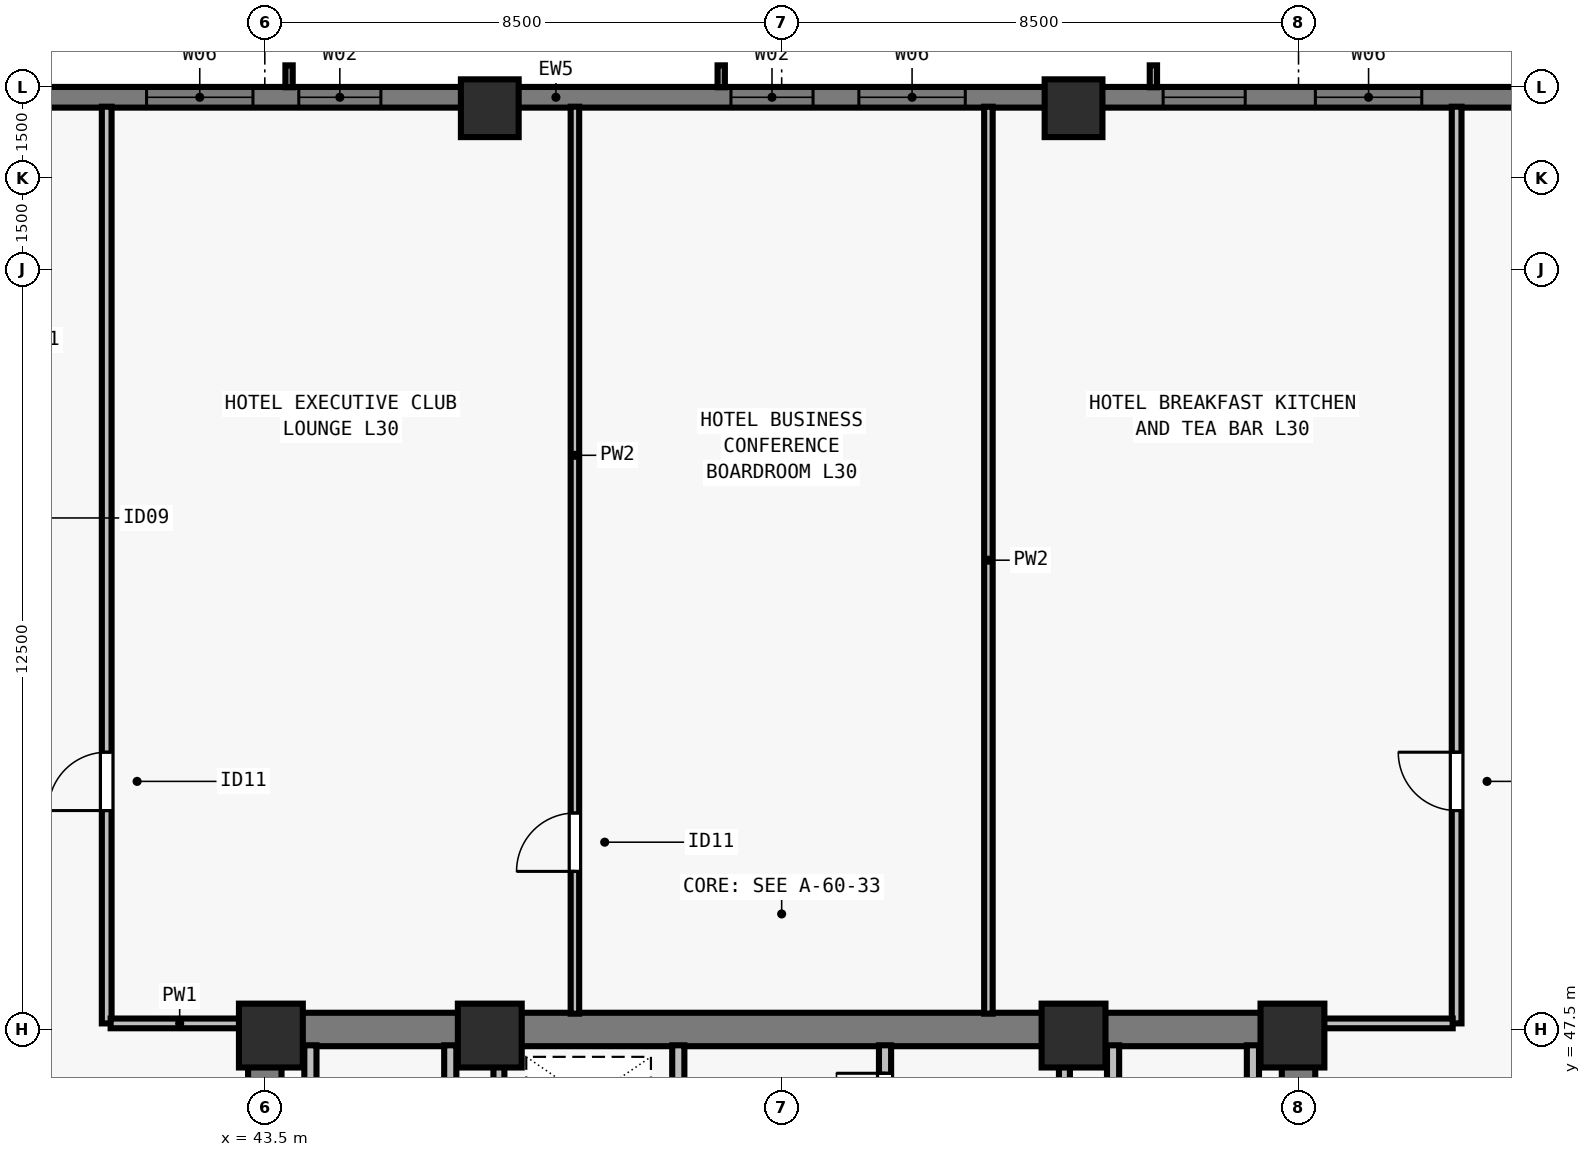
"""IFC4 building model, lengths in metres.
Left out: names, types, materials, properties, quantities, classifications, styles, units other than length and angle.
Written with IfcOpenShell. Run it as: python <this file> out.ifc"""

import sys

from ifc_helpers import new_model, si_unit, direction, frame, frame_2d, origin, origin_2d, place, context, subcontext, project, spatial, rectangle, extrude, element, fill, save


model = new_model("IFC4")
c1 = context("Model", 3, precision=1e-05, world=origin(), true_north=direction((0.0, 1.0)))
c2 = subcontext(c1, "Body", "Model", "MODEL_VIEW")
j1 = project(units=[si_unit("LENGTHUNIT", "METRE"), si_unit("PLANEANGLEUNIT", "RADIAN")], contexts=[c1])
p1 = place(None, origin())
s1 = spatial("IfcSite", under=j1, at=p1, CompositionType="ELEMENT")
p2 = place(p1, origin())
s2 = spatial("IfcBuilding", under=s1, at=p2, CompositionType="ELEMENT")
p3 = place(p2, frame((0.0, 0.0, 113.0)))
s3 = spatial("IfcBuildingStorey", under=s2, at=p3, CompositionType="ELEMENT", Elevation=113.0)
for number, where, z_axis, x_axis in (
    (1, (43.6, 47.4, 0.0), (0.0, 0.0, 1.0), (1.0, 0.0, 0.0)),
    (2, (47.2, 47.4, 0.0), (0.0, 0.0, 1.0), (1.0, 0.0, 0.0)),
    (3, (56.8, 47.4, 0.0), (0.0, 0.0, 1.0), (1.0, 0.0, 0.0)),
    (4, (60.4, 47.4, 0.0), (0.0, 0.0, 1.0), (1.0, 0.0, 0.0)),
):
    element("IfcColumn", number, at=place(p3, frame(where, z_axis=z_axis, x_axis=x_axis)), inside=s3, PredefinedType="COLUMN", context=c2, shape_type="SweptSolid", body=[
        extrude(rectangle(XDim=1.05, YDim=1.05, at=origin_2d()), origin(), (0.0, 0.0, 1.0), 3.5),
    ])
for number, where, z_axis, x_axis in (
    (5, (56.8, 62.65, 0.0), (0.0, 0.0, 1.0), (1.0, 0.0, 0.0)),
    (6, (47.2, 62.65, 0.0), (0.0, 0.0, 1.0), (1.0, 0.0, 0.0)),
):
    element("IfcColumn", number, at=place(p3, frame(where, z_axis=z_axis, x_axis=x_axis)), inside=s3, PredefinedType="COLUMN", context=c2, shape_type="SweptSolid", body=[
        extrude(rectangle(XDim=0.95, YDim=0.95, at=origin_2d()), origin(), (0.0, 0.0, 1.0), 3.5),
    ])
p4 = place(p3, frame((32.0, 62.83, 0.0), z_axis=(0.0, 0.0, 1.0), x_axis=(1.0, 0.0, 0.0)))
e7 = element("IfcWall", 7, at=p4, inside=s3, PredefinedType="SOLIDWALL", context=c2, shape_type="SweptSolid", body=[
    extrude(rectangle(XDim=39.682, YDim=0.34, at=frame_2d((19.841, 0.0))), origin(), (0.0, 0.0, 1.0), 3.28),
])
p5 = place(p4, frame((4.952, 0.0, 0.8)))
e8 = element("IfcOpeningElement", 8, at=p5, cuts=e7, PredefinedType="OPENING", context=c2, shape_type="SweptSolid", body=[
    extrude(rectangle(XDim=1.35, YDim=1.66, at=frame_2d((0.675, 0.83))), frame((0.0, 0.18, 0.0), z_axis=(0.0, -1.0, 0.0), x_axis=(1.0, 0.0, 0.0)), (0.0, 0.0, 1.0), 0.36),
])
p6 = place(p4, frame((9.555, 0.0, 0.8)))
e9 = element("IfcOpeningElement", 9, at=p6, cuts=e7, PredefinedType="OPENING", context=c2, shape_type="SweptSolid", body=[
    extrude(rectangle(XDim=1.75, YDim=1.66, at=frame_2d((0.875, 0.83))), frame((0.0, 0.18, 0.0), z_axis=(0.0, -1.0, 0.0), x_axis=(1.0, 0.0, 0.0)), (0.0, 0.0, 1.0), 0.36),
])
p7 = place(p4, frame((12.059, 0.0, 0.8)))
e10 = element("IfcOpeningElement", 10, at=p7, cuts=e7, PredefinedType="OPENING", context=c2, shape_type="SweptSolid", body=[
    extrude(rectangle(XDim=1.35, YDim=1.66, at=frame_2d((0.675, 0.83))), frame((0.0, 0.18, 0.0), z_axis=(0.0, -1.0, 0.0), x_axis=(1.0, 0.0, 0.0)), (0.0, 0.0, 1.0), 0.36),
])
p8 = place(p4, frame((19.166, 0.0, 0.8)))
e11 = element("IfcOpeningElement", 11, at=p8, cuts=e7, PredefinedType="OPENING", context=c2, shape_type="SweptSolid", body=[
    extrude(rectangle(XDim=1.35, YDim=1.66, at=frame_2d((0.675, 0.83))), frame((0.0, 0.18, 0.0), z_axis=(0.0, -1.0, 0.0), x_axis=(1.0, 0.0, 0.0)), (0.0, 0.0, 1.0), 0.36),
])
p9 = place(p4, frame((21.27, 0.0, 0.8)))
e12 = element("IfcOpeningElement", 12, at=p9, cuts=e7, PredefinedType="OPENING", context=c2, shape_type="SweptSolid", body=[
    extrude(rectangle(XDim=1.75, YDim=1.66, at=frame_2d((0.875, 0.83))), frame((0.0, 0.18, 0.0), z_axis=(0.0, -1.0, 0.0), x_axis=(1.0, 0.0, 0.0)), (0.0, 0.0, 1.0), 0.36),
])
p10 = place(p4, frame((26.273, 0.0, 0.8)))
e13 = element("IfcOpeningElement", 13, at=p10, cuts=e7, PredefinedType="OPENING", context=c2, shape_type="SweptSolid", body=[
    extrude(rectangle(XDim=1.35, YDim=1.66, at=frame_2d((0.675, 0.83))), frame((0.0, 0.18, 0.0), z_axis=(0.0, -1.0, 0.0), x_axis=(1.0, 0.0, 0.0)), (0.0, 0.0, 1.0), 0.36),
])
p11 = place(p4, frame((28.777, 0.0, 0.8)))
e14 = element("IfcOpeningElement", 14, at=p11, cuts=e7, PredefinedType="OPENING", context=c2, shape_type="SweptSolid", body=[
    extrude(rectangle(XDim=1.75, YDim=1.66, at=frame_2d((0.875, 0.83))), frame((0.0, 0.18, 0.0), z_axis=(0.0, -1.0, 0.0), x_axis=(1.0, 0.0, 0.0)), (0.0, 0.0, 1.0), 0.36),
])
p12 = place(p4, frame((33.83, 0.0, 0.8)))
e15 = element("IfcOpeningElement", 15, at=p12, cuts=e7, PredefinedType="OPENING", context=c2, shape_type="SweptSolid", body=[
    extrude(rectangle(XDim=1.35, YDim=1.66, at=frame_2d((0.675, 0.83))), frame((0.0, 0.18, 0.0), z_axis=(0.0, -1.0, 0.0), x_axis=(1.0, 0.0, 0.0)), (0.0, 0.0, 1.0), 0.36),
])
p13 = place(p3, frame((43.225, 47.5, 0.0), z_axis=(0.0, 0.0, 1.0), x_axis=(1.0, 0.0, 0.0)))
e16 = element("IfcWall", 16, at=p13, inside=s3, PredefinedType="SHEAR", context=c2, shape_type="SweptSolid", body=[
    extrude(rectangle(XDim=17.55, YDim=0.55, at=frame_2d((8.775, 0.0))), origin(), (0.0, 0.0, 1.0), 3.28),
])
for number, where, z_axis, x_axis in (
    (17, (43.5, 40.8, 0.0), (0.0, 0.0, 1.0), (0.0, 1.0, 0.0)),
    (18, (60.5, 40.8, 0.0), (0.0, 0.0, 1.0), (0.0, 1.0, 0.0)),
):
    element("IfcWall", number, at=place(p3, frame(where, z_axis=z_axis, x_axis=x_axis)), inside=s3, PredefinedType="SHEAR", context=c2, shape_type="SweptSolid", body=[
        extrude(rectangle(XDim=6.435, YDim=0.55, at=frame_2d((3.218, 0.0))), origin(), (0.0, 0.0, 1.0), 3.28),
    ])
p14 = place(p3, frame((50.3, 40.585, 0.0), z_axis=(0.0, 0.0, 1.0), x_axis=(0.0, 1.0, 0.0)))
e19 = element("IfcWall", 19, at=p14, inside=s3, PredefinedType="SOLIDWALL", context=c2, shape_type="SweptSolid", body=[
    extrude(rectangle(XDim=6.655, YDim=0.2, at=frame_2d((3.328, 0.0))), origin(), (0.0, 0.0, 1.0), 3.28),
])
p15 = place(p14, frame((5.065, 0.0, 0.0)))
e20 = element("IfcOpeningElement", 20, at=p15, cuts=e19, PredefinedType="OPENING", context=c2, shape_type="SweptSolid", body=[
    extrude(rectangle(XDim=0.8, YDim=2.08, at=frame_2d((0.4, 1.04))), frame((0.0, 0.11, 0.0), z_axis=(0.0, -1.0, 0.0), x_axis=(1.0, 0.0, 0.0)), (0.0, 0.0, 1.0), 0.22),
])
p16 = place(p3, frame((53.7, 40.585, 0.0), z_axis=(0.0, 0.0, 1.0), x_axis=(0.0, 1.0, 0.0)))
e21 = element("IfcWall", 21, at=p16, inside=s3, PredefinedType="SOLIDWALL", context=c2, shape_type="SweptSolid", body=[
    extrude(rectangle(XDim=6.655, YDim=0.2, at=frame_2d((3.328, 0.0))), origin(), (0.0, 0.0, 1.0), 3.28),
])
p17 = place(p16, frame((0.195, 0.0, 0.0)))
e22 = element("IfcOpeningElement", 22, at=p17, cuts=e21, PredefinedType="OPENING", context=c2, shape_type="SweptSolid", body=[
    extrude(rectangle(XDim=0.8, YDim=2.08, at=frame_2d((0.4, 1.04))), frame((0.0, 0.11, 0.0), z_axis=(0.0, -1.0, 0.0), x_axis=(1.0, 0.0, 0.0)), (0.0, 0.0, 1.0), 0.22),
])
p18 = place(p16, frame((3.735, 0.0, 0.0)))
e23 = element("IfcOpeningElement", 23, at=p18, cuts=e21, PredefinedType="OPENING", context=c2, shape_type="SweptSolid", body=[
    extrude(rectangle(XDim=0.9, YDim=2.12, at=frame_2d((0.45, 1.06))), frame((0.0, 0.11, 0.0), z_axis=(0.0, -1.0, 0.0), x_axis=(1.0, 0.0, 0.0)), (0.0, 0.0, 1.0), 0.22),
])
p19 = place(p16, frame((5.395, 0.0, 0.0)))
e24 = element("IfcOpeningElement", 24, at=p19, cuts=e21, PredefinedType="OPENING", context=c2, shape_type="SweptSolid", body=[
    extrude(rectangle(XDim=0.8, YDim=2.1, at=frame_2d((0.4, 1.05))), frame((0.0, 0.11, 0.0), z_axis=(0.0, -1.0, 0.0), x_axis=(1.0, 0.0, 0.0)), (0.0, 0.0, 1.0), 0.22),
])
for number, where, z_axis, x_axis in (
    (25, (46.55, 43.735, 0.0), (0.0, 0.0, 1.0), (0.0, 1.0, 0.0)),
    (26, (44.25, 43.735, 0.0), (0.0, 0.0, 1.0), (0.0, 1.0, 0.0)),
    (27, (57.45, 43.735, 0.0), (0.0, 0.0, 1.0), (0.0, 1.0, 0.0)),
    (28, (59.75, 43.735, 0.0), (0.0, 0.0, 1.0), (0.0, 1.0, 0.0)),
):
    element("IfcWall", number, at=place(p3, frame(where, z_axis=z_axis, x_axis=x_axis)), inside=s3, PredefinedType="SOLIDWALL", context=c2, shape_type="SweptSolid", body=[
        extrude(rectangle(XDim=3.505, YDim=0.2, at=frame_2d((1.752, 0.0))), origin(), (0.0, 0.0, 1.0), 3.28),
    ])
for number, where, z_axis, x_axis in (
    (29, (47.35, 43.735, 0.0), (0.0, 0.0, 1.0), (0.0, 1.0, 0.0)),
    (30, (56.65, 43.735, 0.0), (0.0, 0.0, 1.0), (0.0, 1.0, 0.0)),
):
    element("IfcWall", number, at=place(p3, frame(where, z_axis=z_axis, x_axis=x_axis)), inside=s3, PredefinedType="SOLIDWALL", context=c2, shape_type="SweptSolid", body=[
        extrude(rectangle(XDim=3.505, YDim=0.18, at=frame_2d((1.752, 0.0))), origin(), (0.0, 0.0, 1.0), 3.28),
    ])
p20 = place(p3, frame((40.9, 47.6, 0.0), z_axis=(0.0, 0.0, 1.0), x_axis=(0.0, 1.0, 0.0)))
e31 = element("IfcWall", 31, at=p20, inside=s3, PredefinedType="PARTITIONING", context=c2, shape_type="SweptSolid", body=[
    extrude(rectangle(XDim=15.075, YDim=0.16, at=frame_2d((7.538, 0.0))), origin(), (0.0, 0.0, 1.0), 2.555),
])
p21 = place(p20, frame((3.5, 0.0, 0.0)))
e32 = element("IfcOpeningElement", 32, at=p21, cuts=e31, PredefinedType="OPENING", context=c2, shape_type="SweptSolid", body=[
    extrude(rectangle(XDim=0.96, YDim=2.12, at=frame_2d((0.48, 1.06))), frame((0.0, 0.09, 0.0), z_axis=(0.0, -1.0, 0.0), x_axis=(1.0, 0.0, 0.0)), (0.0, 0.0, 1.0), 0.18),
])
p22 = place(p3, frame((40.965, 47.6, 0.0), z_axis=(0.0, 0.0, 1.0), x_axis=(1.0, 0.0, 0.0)))
e33 = element("IfcWall", 33, at=p22, inside=s3, PredefinedType="PARTITIONING", context=c2, shape_type="SweptSolid", body=[
    extrude(rectangle(XDim=2.27, YDim=0.16, at=frame_2d((1.135, 0.0))), origin(), (0.0, 0.0, 1.0), 3.28),
])
p23 = place(p3, frame((63.1, 47.6, 0.0), z_axis=(0.0, 0.0, 1.0), x_axis=(0.0, 1.0, 0.0)))
e34 = element("IfcWall", 34, at=p23, inside=s3, PredefinedType="PARTITIONING", context=c2, shape_type="SweptSolid", body=[
    extrude(rectangle(XDim=15.075, YDim=0.16, at=frame_2d((7.538, 0.0))), origin(), (0.0, 0.0, 1.0), 2.555),
])
p24 = place(p23, frame((3.5, 0.0, 0.0)))
e35 = element("IfcOpeningElement", 35, at=p24, cuts=e34, PredefinedType="OPENING", context=c2, shape_type="SweptSolid", body=[
    extrude(rectangle(XDim=0.96, YDim=2.12, at=frame_2d((0.48, 1.06))), frame((0.0, 0.09, 0.0), z_axis=(0.0, -1.0, 0.0), x_axis=(1.0, 0.0, 0.0)), (0.0, 0.0, 1.0), 0.18),
])
p25 = place(p3, frame((60.765, 47.6, 0.0), z_axis=(0.0, 0.0, 1.0), x_axis=(1.0, 0.0, 0.0)))
e36 = element("IfcWall", 36, at=p25, inside=s3, PredefinedType="PARTITIONING", context=c2, shape_type="SweptSolid", body=[
    extrude(rectangle(XDim=2.27, YDim=0.16, at=frame_2d((1.135, 0.0))), origin(), (0.0, 0.0, 1.0), 3.28),
])
p26 = place(p3, frame((48.6, 47.76, 0.0), z_axis=(0.0, 0.0, 1.0), x_axis=(0.0, 1.0, 0.0)))
e37 = element("IfcWall", 37, at=p26, inside=s3, PredefinedType="PARTITIONING", context=c2, shape_type="SweptSolid", body=[
    extrude(rectangle(XDim=14.915, YDim=0.14, at=frame_2d((7.458, 0.0))), origin(), (0.0, 0.0, 1.0), 2.896),
])
p27 = place(p26, frame((2.34, 0.0, 0.0)))
e38 = element("IfcOpeningElement", 38, at=p27, cuts=e37, PredefinedType="OPENING", context=c2, shape_type="SweptSolid", body=[
    extrude(rectangle(XDim=0.96, YDim=2.12, at=frame_2d((0.48, 1.06))), frame((0.0, 0.08, 0.0), z_axis=(0.0, -1.0, 0.0), x_axis=(1.0, 0.0, 0.0)), (0.0, 0.0, 1.0), 0.16),
])
p28 = place(p3, frame((55.4, 47.76, 0.0), z_axis=(0.0, 0.0, 1.0), x_axis=(0.0, 1.0, 0.0)))
e39 = element("IfcWall", 39, at=p28, inside=s3, PredefinedType="PARTITIONING", context=c2, shape_type="SweptSolid", body=[
    extrude(rectangle(XDim=14.915, YDim=0.14, at=frame_2d((7.458, 0.0))), origin(), (0.0, 0.0, 1.0), 2.896),
])
p29 = place(p6, origin())
e40 = element("IfcWindow", 40, at=p29, inside=s3, PartitioningType="SINGLE_PANEL", PredefinedType="WINDOW", context=c2, shape_type="SweptSolid", body=[
    extrude(rectangle(XDim=1.75, YDim=1.66, at=frame_2d((0.875, 0.83))), frame((0.0, -0.05, 0.0), z_axis=(0.0, -1.0, 0.0), x_axis=(1.0, 0.0, 0.0)), (0.0, 0.0, 1.0), 0.06),
])
fill(e9, e40)
p30 = place(p7, origin())
e41 = element("IfcWindow", 41, at=p30, inside=s3, PartitioningType="SINGLE_PANEL", PredefinedType="WINDOW", context=c2, shape_type="SweptSolid", body=[
    extrude(rectangle(XDim=1.35, YDim=1.66, at=frame_2d((0.675, 0.83))), frame((0.0, -0.05, 0.0), z_axis=(0.0, -1.0, 0.0), x_axis=(1.0, 0.0, 0.0)), (0.0, 0.0, 1.0), 0.06),
])
fill(e10, e41)
p31 = place(p8, origin())
e42 = element("IfcWindow", 42, at=p31, inside=s3, PartitioningType="SINGLE_PANEL", PredefinedType="WINDOW", context=c2, shape_type="SweptSolid", body=[
    extrude(rectangle(XDim=1.35, YDim=1.66, at=frame_2d((0.675, 0.83))), frame((0.0, -0.05, 0.0), z_axis=(0.0, -1.0, 0.0), x_axis=(1.0, 0.0, 0.0)), (0.0, 0.0, 1.0), 0.06),
])
fill(e11, e42)
p32 = place(p9, origin())
e43 = element("IfcWindow", 43, at=p32, inside=s3, PartitioningType="SINGLE_PANEL", PredefinedType="WINDOW", context=c2, shape_type="SweptSolid", body=[
    extrude(rectangle(XDim=1.75, YDim=1.66, at=frame_2d((0.875, 0.83))), frame((0.0, -0.05, 0.0), z_axis=(0.0, -1.0, 0.0), x_axis=(1.0, 0.0, 0.0)), (0.0, 0.0, 1.0), 0.06),
])
fill(e12, e43)
p33 = place(p10, origin())
e44 = element("IfcWindow", 44, at=p33, inside=s3, PartitioningType="SINGLE_PANEL", PredefinedType="WINDOW", context=c2, shape_type="SweptSolid", body=[
    extrude(rectangle(XDim=1.35, YDim=1.66, at=frame_2d((0.675, 0.83))), frame((0.0, -0.05, 0.0), z_axis=(0.0, -1.0, 0.0), x_axis=(1.0, 0.0, 0.0)), (0.0, 0.0, 1.0), 0.06),
])
fill(e13, e44)
p34 = place(p11, origin())
e45 = element("IfcWindow", 45, at=p34, inside=s3, PartitioningType="SINGLE_PANEL", PredefinedType="WINDOW", context=c2, shape_type="SweptSolid", body=[
    extrude(rectangle(XDim=1.75, YDim=1.66, at=frame_2d((0.875, 0.83))), frame((0.0, -0.05, 0.0), z_axis=(0.0, -1.0, 0.0), x_axis=(1.0, 0.0, 0.0)), (0.0, 0.0, 1.0), 0.06),
])
fill(e14, e45)
p35 = place(p19, origin())
e46 = element("IfcDoor", 46, at=p35, inside=s3, OperationType="SINGLE_SWING_RIGHT", PredefinedType="DOOR", context=c2, shape_type="SweptSolid", body=[
    extrude(rectangle(XDim=0.8, YDim=2.1, at=frame_2d((0.4, 1.05))), frame((0.0, 0.025, 0.0), z_axis=(0.0, -1.0, 0.0), x_axis=(1.0, 0.0, 0.0)), (0.0, 0.0, 1.0), 0.05),
])
fill(e24, e46)
p36 = place(p21, origin())
e47 = element("IfcDoor", 47, at=p36, inside=s3, OperationType="SINGLE_SWING_LEFT", PredefinedType="DOOR", context=c2, shape_type="SweptSolid", body=[
    extrude(rectangle(XDim=0.96, YDim=2.12, at=frame_2d((0.48, 1.06))), frame((0.0, 0.025, 0.0), z_axis=(0.0, -1.0, 0.0), x_axis=(1.0, 0.0, 0.0)), (0.0, 0.0, 1.0), 0.05),
])
fill(e32, e47)
p37 = place(p24, origin())
e48 = element("IfcDoor", 48, at=p37, inside=s3, OperationType="SINGLE_SWING_RIGHT", PredefinedType="DOOR", context=c2, shape_type="SweptSolid", body=[
    extrude(rectangle(XDim=0.96, YDim=2.12, at=frame_2d((0.48, 1.06))), frame((0.0, 0.025, 0.0), z_axis=(0.0, -1.0, 0.0), x_axis=(1.0, 0.0, 0.0)), (0.0, 0.0, 1.0), 0.05),
])
fill(e35, e48)
p38 = place(p27, origin())
e49 = element("IfcDoor", 49, at=p38, inside=s3, OperationType="SINGLE_SWING_LEFT", PredefinedType="DOOR", context=c2, shape_type="SweptSolid", body=[
    extrude(rectangle(XDim=0.96, YDim=2.12, at=frame_2d((0.48, 1.06))), frame((0.0, 0.025, 0.0), z_axis=(0.0, -1.0, 0.0), x_axis=(1.0, 0.0, 0.0)), (0.0, 0.0, 1.0), 0.05),
])
fill(e38, e49)
save(model, sys.argv[1])
